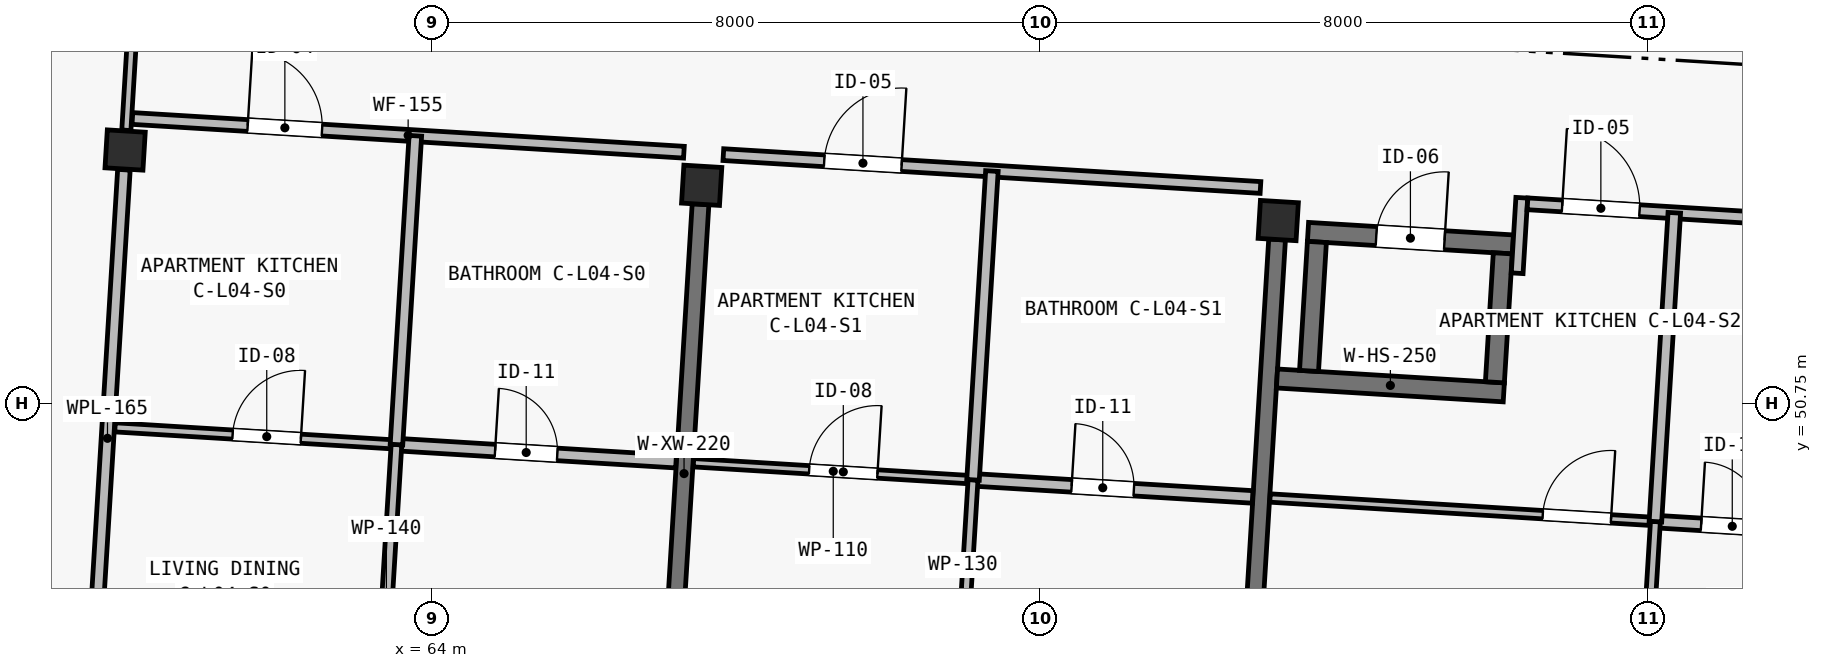
"""IFC4 building model, lengths in metres.
Left out: names, types, materials, properties, quantities, classifications, styles, units other than length and angle.
Written with IfcOpenShell. Run it as: python <this file> out.ifc"""

import sys

from ifc_helpers import new_model, si_unit, direction, frame, frame_2d, origin, origin_2d, place, context, subcontext, project, spatial, rectangle, extrude, element, fill, save


model = new_model("IFC4")
c1 = context("Model", 3, precision=1e-05, world=origin(), true_north=direction((0.0, 1.0)))
c2 = subcontext(c1, "Body", "Model", "MODEL_VIEW")
j1 = project(units=[si_unit("LENGTHUNIT", "METRE"), si_unit("PLANEANGLEUNIT", "RADIAN")], contexts=[c1])
p1 = place(None, origin())
s1 = spatial("IfcSite", under=j1, at=p1, CompositionType="ELEMENT")
p2 = place(p1, origin())
s2 = spatial("IfcBuilding", under=s1, at=p2, CompositionType="ELEMENT")
p3 = place(p2, frame((0.0, 0.0, 14.9)))
s3 = spatial("IfcBuildingStorey", under=s2, at=p3, CompositionType="ELEMENT", Elevation=14.9)
for number, where, z_axis, x_axis in (
    (1, (59.964, 54.086, 0.0), (0.0, 0.0, 1.0), (0.998, -0.061, 0.0)),
    (2, (67.55, 53.622, 0.0), (0.0, 0.0, 1.0), (0.998, -0.061, 0.0)),
    (3, (75.135, 53.158, 0.0), (0.0, 0.0, 1.0), (0.998, -0.061, 0.0)),
):
    element("IfcColumn", number, at=place(p3, frame(where, z_axis=z_axis, x_axis=x_axis)), inside=s3, PredefinedType="COLUMN", context=c2, shape_type="SweptSolid", body=[
        extrude(rectangle(XDim=0.5, YDim=0.5, at=origin_2d()), origin(), (0.0, 0.0, 1.0), 3.25),
    ])
p4 = place(p3, frame((67.101, 46.286, 0.0), z_axis=(0.0, 0.0, 1.0), x_axis=(0.061035953884, 0.998135568114, 0.0)))
e4 = element("IfcWall", 4, at=p4, inside=s3, PredefinedType="SHEAR", context=c2, shape_type="SweptSolid", body=[
    extrude(rectangle(XDim=7.1, YDim=0.22, at=frame_2d((3.55, 0.0))), origin(), (0.0, 0.0, 1.0), 2.5),
])
p5 = place(p3, frame((74.687, 45.822, 0.0), z_axis=(0.0, 0.0, 1.0), x_axis=(0.061033859059, 0.99813569621, 0.0)))
e5 = element("IfcWall", 5, at=p5, inside=s3, PredefinedType="SHEAR", context=c2, shape_type="SweptSolid", body=[
    extrude(rectangle(XDim=7.1, YDim=0.22, at=frame_2d((3.55, 0.0))), origin(), (0.0, 0.0, 1.0), 2.5),
])
p6 = place(p3, frame((75.119, 51.08, 0.0), z_axis=(0.0, 0.0, 1.0), x_axis=(0.998133370443, -0.061071882298, 0.0)))
e6 = element("IfcWall", 6, at=p6, inside=s3, PredefinedType="SHEAR", context=c2, shape_type="SweptSolid", body=[
    extrude(rectangle(XDim=2.99, YDim=0.25, at=frame_2d((1.495, 0.0))), origin(), (0.0, 0.0, 1.0), 3.25),
])
p7 = place(p3, frame((75.527, 53.009, 0.0), z_axis=(0.0, 0.0, 1.0), x_axis=(0.998129907752, -0.061128448781, 0.0)))
e7 = element("IfcWall", 7, at=p7, inside=s3, PredefinedType="SHEAR", context=c2, shape_type="SweptSolid", body=[
    extrude(rectangle(XDim=2.7, YDim=0.25, at=frame_2d((1.35, 0.0))), origin(), (0.0, 0.0, 1.0), 3.25),
])
p8 = place(p7, frame((0.9, 0.0, 0.0)))
e8 = element("IfcOpeningElement", 8, at=p8, cuts=e7, PredefinedType="OPENING", context=c2, shape_type="SweptSolid", body=[
    extrude(rectangle(XDim=0.9, YDim=2.05, at=frame_2d((0.45, 1.025))), frame((0.0, 0.14, 0.0), z_axis=(0.0, -1.0, 0.0), x_axis=(1.0, 0.0, 0.0)), (0.0, 0.0, 1.0), 0.28),
])
p9 = place(p3, frame((75.541, 51.179, 0.0), z_axis=(0.0, 0.0, 1.0), x_axis=(0.061037062968, 0.998135500293, 0.0)))
e9 = element("IfcWall", 9, at=p9, inside=s3, PredefinedType="SHEAR", context=c2, shape_type="SweptSolid", body=[
    extrude(rectangle(XDim=1.7, YDim=0.25, at=frame_2d((0.85, 0.0))), origin(), (0.0, 0.0, 1.0), 3.25),
])
p10 = place(p3, frame((77.986, 51.03, 0.0), z_axis=(0.0, 0.0, 1.0), x_axis=(0.061028314627, 0.998136035225, 0.0)))
e10 = element("IfcWall", 10, at=p10, inside=s3, PredefinedType="SHEAR", context=c2, shape_type="SweptSolid", body=[
    extrude(rectangle(XDim=1.7, YDim=0.25, at=frame_2d((0.85, 0.0))), origin(), (0.0, 0.0, 1.0), 3.25),
])
p11 = place(p3, frame((58.944, 46.008, 0.0), z_axis=(0.0, 0.0, 1.0), x_axis=(-0.897775054318, 0.440454256246, 0.0)))
e11 = element("IfcWall", 11, at=p11, inside=s3, PredefinedType="SOLIDWALL", context=c2, shape_type="SweptSolid", body=[
    extrude(rectangle(XDim=8.12, YDim=0.26, at=frame_2d((4.06, 0.0))), origin(), (0.0, 0.0, 1.0), 3.0),
])
p12 = place(p11, frame((2.45, 0.0, 0.45)))
e12 = element("IfcOpeningElement", 12, at=p12, cuts=e11, PredefinedType="OPENING", context=c2, shape_type="SweptSolid", body=[
    extrude(rectangle(XDim=0.76, YDim=2.34, at=frame_2d((0.38, 1.17))), frame((0.0, 0.145, 0.0), z_axis=(0.0, -1.0, 0.0), x_axis=(1.0, 0.0, 0.0)), (0.0, 0.0, 1.0), 0.29),
])
p13 = place(p11, frame((5.07, 0.0, 0.52)))
e13 = element("IfcOpeningElement", 13, at=p13, cuts=e11, PredefinedType="OPENING", context=c2, shape_type="SweptSolid", body=[
    extrude(rectangle(XDim=0.6, YDim=2.22, at=frame_2d((0.3, 1.11))), frame((0.0, 0.145, 0.0), z_axis=(0.0, -1.0, 0.0), x_axis=(1.0, 0.0, 0.0)), (0.0, 0.0, 1.0), 0.29),
])
p14 = place(p3, frame((51.654, 49.585, 0.0), z_axis=(0.0, 0.0, 1.0), x_axis=(0.448621989068, 0.893721607059, 0.0)))
e14 = element("IfcWall", 14, at=p14, inside=s3, PredefinedType="SOLIDWALL", context=c2, shape_type="SweptSolid", body=[
    extrude(rectangle(XDim=19.061, YDim=0.26, at=frame_2d((9.53, 0.0))), origin(), (0.0, 0.0, 1.0), 3.0),
])
p15 = place(p14, frame((2.45, 0.0, 0.45)))
e15 = element("IfcOpeningElement", 15, at=p15, cuts=e14, PredefinedType="OPENING", context=c2, shape_type="SweptSolid", body=[
    extrude(rectangle(XDim=0.76, YDim=2.34, at=frame_2d((0.38, 1.17))), frame((0.0, 0.145, 0.0), z_axis=(0.0, -1.0, 0.0), x_axis=(1.0, 0.0, 0.0)), (0.0, 0.0, 1.0), 0.29),
])
p16 = place(p14, frame((16.01, 0.0, 0.52)))
e16 = element("IfcOpeningElement", 16, at=p16, cuts=e14, PredefinedType="OPENING", context=c2, shape_type="SweptSolid", body=[
    extrude(rectangle(XDim=0.6, YDim=2.22, at=frame_2d((0.3, 1.11))), frame((0.0, 0.145, 0.0), z_axis=(0.0, -1.0, 0.0), x_axis=(1.0, 0.0, 0.0)), (0.0, 0.0, 1.0), 0.29),
])
p17 = place(p3, frame((59.98, 54.345, 0.0), z_axis=(0.0, 0.0, 1.0), x_axis=(0.061101107425, 0.998131581843, 0.0)))
e17 = element("IfcWall", 17, at=p17, inside=s3, PredefinedType="PARTITIONING", context=c2, shape_type="SweptSolid", body=[
    extrude(rectangle(XDim=3.88, YDim=0.12, at=frame_2d((1.94, 0.0))), origin(), (0.0, 0.0, 1.0), 2.5),
])
p18 = place(p17, frame((1.35, 0.0, 0.0)))
e18 = element("IfcOpeningElement", 18, at=p18, cuts=e17, PredefinedType="OPENING", context=c2, shape_type="SweptSolid", body=[
    extrude(rectangle(XDim=0.9, YDim=2.1, at=frame_2d((0.45, 1.05))), frame((0.0, 0.075, 0.0), z_axis=(0.0, -1.0, 0.0), x_axis=(1.0, 0.0, 0.0)), (0.0, 0.0, 1.0), 0.15),
])
p19 = place(p3, frame((59.516, 46.76, 0.0), z_axis=(0.0, 0.0, 1.0), x_axis=(0.061034344288, 0.998135666539, 0.0)))
e19 = element("IfcWall", 19, at=p19, inside=s3, PredefinedType="PLUMBINGWALL", context=c2, shape_type="SweptSolid", body=[
    extrude(rectangle(XDim=7.08, YDim=0.165, at=frame_2d((3.54, 0.0))), origin(), (0.0, 0.0, 1.0), 2.5),
])
p20 = place(p3, frame((60.06, 54.501, 0.0), z_axis=(0.0, 0.0, 1.0), x_axis=(0.998134543433, -0.06105270843, 0.0)))
e20 = element("IfcWall", 20, at=p20, inside=s3, PredefinedType="PARTITIONING", context=c2, shape_type="SweptSolid", body=[
    extrude(rectangle(XDim=7.27, YDim=0.155, at=frame_2d((3.635, 0.0))), origin(), (0.0, 0.0, 1.0), 2.97),
])
p21 = place(p20, frame((1.52, 0.0, 0.0)))
e21 = element("IfcOpeningElement", 21, at=p21, cuts=e20, PredefinedType="OPENING", context=c2, shape_type="SweptSolid", body=[
    extrude(rectangle(XDim=0.98, YDim=2.15, at=frame_2d((0.49, 1.075))), frame((0.0, 0.093, 0.0), z_axis=(0.0, -1.0, 0.0), x_axis=(1.0, 0.0, 0.0)), (0.0, 0.0, 1.0), 0.185),
])
p22 = place(p3, frame((59.831, 50.437, 0.0), z_axis=(0.0, 0.0, 1.0), x_axis=(0.998133408508, -0.061071260176, 0.0)))
e22 = element("IfcWall", 22, at=p22, inside=s3, PredefinedType="PARTITIONING", context=c2, shape_type="SweptSolid", body=[
    extrude(rectangle(XDim=3.71, YDim=0.12, at=frame_2d((1.855, 0.0))), origin(), (0.0, 0.0, 1.0), 2.97),
])
p23 = place(p22, frame((1.55, 0.0, 0.0)))
e23 = element("IfcOpeningElement", 23, at=p23, cuts=e22, PredefinedType="OPENING", context=c2, shape_type="SweptSolid", body=[
    extrude(rectangle(XDim=0.9, YDim=2.1, at=frame_2d((0.45, 1.05))), frame((0.0, 0.075, 0.0), z_axis=(0.0, -1.0, 0.0), x_axis=(1.0, 0.0, 0.0)), (0.0, 0.0, 1.0), 0.15),
])
p24 = place(p3, frame((63.534, 50.211, 0.0), z_axis=(0.0, 0.0, 1.0), x_axis=(0.998132682596, -0.061083123148, 0.0)))
e24 = element("IfcWall", 24, at=p24, inside=s3, PredefinedType="PLUMBINGWALL", context=c2, shape_type="SweptSolid", body=[
    extrude(rectangle(XDim=3.685, YDim=0.165, at=frame_2d((1.843, 0.0))), origin(), (0.0, 0.0, 1.0), 2.97),
])
p25 = place(p24, frame((1.3, 0.0, 0.0)))
e25 = element("IfcOpeningElement", 25, at=p25, cuts=e24, PredefinedType="OPENING", context=c2, shape_type="SweptSolid", body=[
    extrude(rectangle(XDim=0.82, YDim=2.08, at=frame_2d((0.41, 1.04))), frame((0.0, 0.097, 0.0), z_axis=(0.0, -1.0, 0.0), x_axis=(1.0, 0.0, 0.0)), (0.0, 0.0, 1.0), 0.195),
])
p26 = place(p3, frame((63.269, 45.879, 0.0), z_axis=(0.0, 0.0, 1.0), x_axis=(0.06103343432, 0.998135722182, 0.0)))
e26 = element("IfcWall", 26, at=p26, inside=s3, PredefinedType="PARTITIONING", context=c2, shape_type="SweptSolid", body=[
    extrude(rectangle(XDim=4.34, YDim=0.14, at=frame_2d((2.17, 0.0))), origin(), (0.0, 0.0, 1.0), 2.97),
])
p27 = place(p26, frame((1.35, 0.0, 0.0)))
e27 = element("IfcOpeningElement", 27, at=p27, cuts=e26, PredefinedType="OPENING", context=c2, shape_type="SweptSolid", body=[
    extrude(rectangle(XDim=0.9, YDim=2.1, at=frame_2d((0.45, 1.05))), frame((0.0, 0.085, 0.0), z_axis=(0.0, -1.0, 0.0), x_axis=(1.0, 0.0, 0.0)), (0.0, 0.0, 1.0), 0.17),
])
p28 = place(p3, frame((63.534, 50.211, 0.0), z_axis=(0.0, 0.0, 1.0), x_axis=(0.061067374954, 0.99813364622, 0.0)))
e28 = element("IfcWall", 28, at=p28, inside=s3, PredefinedType="PLUMBINGWALL", context=c2, shape_type="SweptSolid", body=[
    extrude(rectangle(XDim=4.07, YDim=0.165, at=frame_2d((2.035, 0.0))), origin(), (0.0, 0.0, 1.0), 2.97),
])
p29 = place(p3, frame((67.835, 54.025, 0.0), z_axis=(0.0, 0.0, 1.0), x_axis=(0.998135666539, -0.061034344288, 0.0)))
e29 = element("IfcWall", 29, at=p29, inside=s3, PredefinedType="PARTITIONING", context=c2, shape_type="SweptSolid", body=[
    extrude(rectangle(XDim=7.08, YDim=0.155, at=frame_2d((3.54, 0.0))), origin(), (0.0, 0.0, 1.0), 2.97),
])
p30 = place(p29, frame((1.33, 0.0, 0.0)))
e30 = element("IfcOpeningElement", 30, at=p30, cuts=e29, PredefinedType="OPENING", context=c2, shape_type="SweptSolid", body=[
    extrude(rectangle(XDim=1.02, YDim=2.2, at=frame_2d((0.51, 1.1))), frame((0.0, 0.093, 0.0), z_axis=(0.0, -1.0, 0.0), x_axis=(1.0, 0.0, 0.0)), (0.0, 0.0, 1.0), 0.185),
])
p31 = place(p3, frame((67.442, 49.972, 0.0), z_axis=(0.0, 0.0, 1.0), x_axis=(0.998132682596, -0.061083123148, 0.0)))
e31 = element("IfcWall", 31, at=p31, inside=s3, PredefinedType="PARTITIONING", context=c2, shape_type="SweptSolid", body=[
    extrude(rectangle(XDim=3.685, YDim=0.11, at=frame_2d((1.843, 0.0))), origin(), (0.0, 0.0, 1.0), 2.97),
])
p32 = place(p31, frame((1.525, 0.0, 0.0)))
e32 = element("IfcOpeningElement", 32, at=p32, cuts=e31, PredefinedType="OPENING", context=c2, shape_type="SweptSolid", body=[
    extrude(rectangle(XDim=0.9, YDim=2.1, at=frame_2d((0.45, 1.05))), frame((0.0, 0.07, 0.0), z_axis=(0.0, -1.0, 0.0), x_axis=(1.0, 0.0, 0.0)), (0.0, 0.0, 1.0), 0.14),
])
p33 = place(p3, frame((71.12, 49.747, 0.0), z_axis=(0.0, 0.0, 1.0), x_axis=(0.998136719672, -0.061017119263, 0.0)))
e33 = element("IfcWall", 33, at=p33, inside=s3, PredefinedType="PLUMBINGWALL", context=c2, shape_type="SweptSolid", body=[
    extrude(rectangle(XDim=3.685, YDim=0.165, at=frame_2d((1.843, 0.0))), origin(), (0.0, 0.0, 1.0), 2.97),
])
p34 = place(p33, frame((1.3, 0.0, 0.0)))
e34 = element("IfcOpeningElement", 34, at=p34, cuts=e33, PredefinedType="OPENING", context=c2, shape_type="SweptSolid", body=[
    extrude(rectangle(XDim=0.82, YDim=2.08, at=frame_2d((0.41, 1.04))), frame((0.0, 0.097, 0.0), z_axis=(0.0, -1.0, 0.0), x_axis=(1.0, 0.0, 0.0)), (0.0, 0.0, 1.0), 0.195),
])
p35 = place(p3, frame((70.855, 45.415, 0.0), z_axis=(0.0, 0.0, 1.0), x_axis=(0.061036861365, 0.998135512621, 0.0)))
e35 = element("IfcWall", 35, at=p35, inside=s3, PredefinedType="PARTITIONING", context=c2, shape_type="SweptSolid", body=[
    extrude(rectangle(XDim=4.34, YDim=0.13, at=frame_2d((2.17, 0.0))), origin(), (0.0, 0.0, 1.0), 2.97),
])
p36 = place(p35, frame((1.35, 0.0, 0.0)))
e36 = element("IfcOpeningElement", 36, at=p36, cuts=e35, PredefinedType="OPENING", context=c2, shape_type="SweptSolid", body=[
    extrude(rectangle(XDim=0.88, YDim=2.1, at=frame_2d((0.44, 1.05))), frame((0.0, 0.08, 0.0), z_axis=(0.0, -1.0, 0.0), x_axis=(1.0, 0.0, 0.0)), (0.0, 0.0, 1.0), 0.16),
])
p37 = place(p3, frame((71.12, 49.747, 0.0), z_axis=(0.0, 0.0, 1.0), x_axis=(0.061063718724, 0.998133869907, 0.0)))
e37 = element("IfcWall", 37, at=p37, inside=s3, PredefinedType="PLUMBINGWALL", context=c2, shape_type="SweptSolid", body=[
    extrude(rectangle(XDim=4.07, YDim=0.165, at=frame_2d((2.035, 0.0))), origin(), (0.0, 0.0, 1.0), 2.97),
])
p38 = place(p3, frame((78.279, 52.465, 0.0), z_axis=(0.0, 0.0, 1.0), x_axis=(0.061095097219, 0.998131949742, 0.0)))
e38 = element("IfcWall", 38, at=p38, inside=s3, PredefinedType="PARTITIONING", context=c2, shape_type="SweptSolid", body=[
    extrude(rectangle(XDim=0.995, YDim=0.155, at=frame_2d((0.498, 0.0))), origin(), (0.0, 0.0, 1.0), 2.97),
])
p39 = place(p3, frame((78.415, 53.378, 0.0), z_axis=(0.0, 0.0, 1.0), x_axis=(0.998131852862, -0.061096679962, 0.0)))
e39 = element("IfcWall", 39, at=p39, inside=s3, PredefinedType="PARTITIONING", context=c2, shape_type="SweptSolid", body=[
    extrude(rectangle(XDim=4.08, YDim=0.155, at=frame_2d((2.04, 0.0))), origin(), (0.0, 0.0, 1.0), 2.97),
])
p40 = place(p39, frame((0.457, 0.0, 0.0)))
e40 = element("IfcOpeningElement", 40, at=p40, cuts=e39, PredefinedType="OPENING", context=c2, shape_type="SweptSolid", body=[
    extrude(rectangle(XDim=1.02, YDim=2.2, at=frame_2d((0.51, 1.1))), frame((0.0, 0.093, 0.0), z_axis=(0.0, -1.0, 0.0), x_axis=(1.0, 0.0, 0.0)), (0.0, 0.0, 1.0), 0.185),
])
p41 = place(p3, frame((75.028, 49.508, 0.0), z_axis=(0.0, 0.0, 1.0), x_axis=(0.998135637207, -0.061034823981, 0.0)))
e41 = element("IfcWall", 41, at=p41, inside=s3, PredefinedType="PARTITIONING", context=c2, shape_type="SweptSolid", body=[
    extrude(rectangle(XDim=5.08, YDim=0.11, at=frame_2d((2.54, 0.0))), origin(), (0.0, 0.0, 1.0), 2.97),
])
p42 = place(p41, frame((3.595, 0.0, 0.0)))
e42 = element("IfcOpeningElement", 42, at=p42, cuts=e41, PredefinedType="OPENING", context=c2, shape_type="SweptSolid", body=[
    extrude(rectangle(XDim=0.9, YDim=2.1, at=frame_2d((0.45, 1.05))), frame((0.0, 0.07, 0.0), z_axis=(0.0, -1.0, 0.0), x_axis=(1.0, 0.0, 0.0)), (0.0, 0.0, 1.0), 0.14),
])
p43 = place(p3, frame((80.098, 49.198, 0.0), z_axis=(0.0, 0.0, 1.0), x_axis=(0.998138723231, -0.060984335579, 0.0)))
e43 = element("IfcWall", 43, at=p43, inside=s3, PredefinedType="PLUMBINGWALL", context=c2, shape_type="SweptSolid", body=[
    extrude(rectangle(XDim=2.29, YDim=0.165, at=frame_2d((1.145, 0.0))), origin(), (0.0, 0.0, 1.0), 2.97),
])
p44 = place(p43, frame((0.603, 0.0, 0.0)))
e44 = element("IfcOpeningElement", 44, at=p44, cuts=e43, PredefinedType="OPENING", context=c2, shape_type="SweptSolid", body=[
    extrude(rectangle(XDim=0.82, YDim=2.08, at=frame_2d((0.41, 1.04))), frame((0.0, 0.097, 0.0), z_axis=(0.0, -1.0, 0.0), x_axis=(1.0, 0.0, 0.0)), (0.0, 0.0, 1.0), 0.195),
])
p45 = place(p3, frame((79.833, 44.866, 0.0), z_axis=(0.0, 0.0, 1.0), x_axis=(0.061036861365, 0.998135512621, 0.0)))
e45 = element("IfcWall", 45, at=p45, inside=s3, PredefinedType="PARTITIONING", context=c2, shape_type="SweptSolid", body=[
    extrude(rectangle(XDim=4.34, YDim=0.13, at=frame_2d((2.17, 0.0))), origin(), (0.0, 0.0, 1.0), 2.97),
])
p46 = place(p45, frame((1.35, 0.0, 0.0)))
e46 = element("IfcOpeningElement", 46, at=p46, cuts=e45, PredefinedType="OPENING", context=c2, shape_type="SweptSolid", body=[
    extrude(rectangle(XDim=0.88, YDim=2.1, at=frame_2d((0.44, 1.05))), frame((0.0, 0.08, 0.0), z_axis=(0.0, -1.0, 0.0), x_axis=(1.0, 0.0, 0.0)), (0.0, 0.0, 1.0), 0.16),
])
p47 = place(p3, frame((80.098, 49.198, 0.0), z_axis=(0.0, 0.0, 1.0), x_axis=(0.061063718724, 0.998133869907, 0.0)))
e47 = element("IfcWall", 47, at=p47, inside=s3, PredefinedType="PLUMBINGWALL", context=c2, shape_type="SweptSolid", body=[
    extrude(rectangle(XDim=4.07, YDim=0.165, at=frame_2d((2.035, 0.0))), origin(), (0.0, 0.0, 1.0), 2.97),
])
p48 = place(p21, origin())
e48 = element("IfcDoor", 48, at=p48, inside=s3, OperationType="SINGLE_SWING_LEFT", PredefinedType="DOOR", context=c2, shape_type="SweptSolid", body=[
    extrude(rectangle(XDim=0.98, YDim=2.15, at=frame_2d((0.49, 1.075))), frame((0.0, 0.025, 0.0), z_axis=(0.0, -1.0, 0.0), x_axis=(1.0, 0.0, 0.0)), (0.0, 0.0, 1.0), 0.05),
])
fill(e21, e48)
p49 = place(p23, origin())
e49 = element("IfcDoor", 49, at=p49, inside=s3, OperationType="SINGLE_SWING_RIGHT", PredefinedType="DOOR", context=c2, shape_type="SweptSolid", body=[
    extrude(rectangle(XDim=0.9, YDim=2.1, at=frame_2d((0.45, 1.05))), frame((0.0, 0.025, 0.0), z_axis=(0.0, -1.0, 0.0), x_axis=(1.0, 0.0, 0.0)), (0.0, 0.0, 1.0), 0.05),
])
fill(e23, e49)
p50 = place(p25, origin())
e50 = element("IfcDoor", 50, at=p50, inside=s3, OperationType="SINGLE_SWING_LEFT", PredefinedType="DOOR", context=c2, shape_type="SweptSolid", body=[
    extrude(rectangle(XDim=0.82, YDim=2.08, at=frame_2d((0.41, 1.04))), frame((0.0, 0.025, 0.0), z_axis=(0.0, -1.0, 0.0), x_axis=(1.0, 0.0, 0.0)), (0.0, 0.0, 1.0), 0.05),
])
fill(e25, e50)
p51 = place(p30, origin())
e51 = element("IfcDoor", 51, at=p51, inside=s3, OperationType="SINGLE_SWING_RIGHT", PredefinedType="DOOR", context=c2, shape_type="SweptSolid", body=[
    extrude(rectangle(XDim=1.02, YDim=2.2, at=frame_2d((0.51, 1.1))), frame((0.0, 0.025, 0.0), z_axis=(0.0, -1.0, 0.0), x_axis=(1.0, 0.0, 0.0)), (0.0, 0.0, 1.0), 0.05),
])
fill(e30, e51)
p52 = place(p32, origin())
e52 = element("IfcDoor", 52, at=p52, inside=s3, OperationType="SINGLE_SWING_RIGHT", PredefinedType="DOOR", context=c2, shape_type="SweptSolid", body=[
    extrude(rectangle(XDim=0.9, YDim=2.1, at=frame_2d((0.45, 1.05))), frame((0.0, 0.025, 0.0), z_axis=(0.0, -1.0, 0.0), x_axis=(1.0, 0.0, 0.0)), (0.0, 0.0, 1.0), 0.05),
])
fill(e32, e52)
p53 = place(p34, origin())
e53 = element("IfcDoor", 53, at=p53, inside=s3, OperationType="SINGLE_SWING_LEFT", PredefinedType="DOOR", context=c2, shape_type="SweptSolid", body=[
    extrude(rectangle(XDim=0.82, YDim=2.08, at=frame_2d((0.41, 1.04))), frame((0.0, 0.025, 0.0), z_axis=(0.0, -1.0, 0.0), x_axis=(1.0, 0.0, 0.0)), (0.0, 0.0, 1.0), 0.05),
])
fill(e34, e53)
p54 = place(p40, origin())
e54 = element("IfcDoor", 54, at=p54, inside=s3, OperationType="SINGLE_SWING_LEFT", PredefinedType="DOOR", context=c2, shape_type="SweptSolid", body=[
    extrude(rectangle(XDim=1.02, YDim=2.2, at=frame_2d((0.51, 1.1))), frame((0.0, 0.025, 0.0), z_axis=(0.0, -1.0, 0.0), x_axis=(1.0, 0.0, 0.0)), (0.0, 0.0, 1.0), 0.05),
])
fill(e40, e54)
p55 = place(p42, origin())
e55 = element("IfcDoor", 55, at=p55, inside=s3, OperationType="SINGLE_SWING_RIGHT", PredefinedType="DOOR", context=c2, shape_type="SweptSolid", body=[
    extrude(rectangle(XDim=0.9, YDim=2.1, at=frame_2d((0.45, 1.05))), frame((0.0, 0.025, 0.0), z_axis=(0.0, -1.0, 0.0), x_axis=(1.0, 0.0, 0.0)), (0.0, 0.0, 1.0), 0.05),
])
fill(e42, e55)
p56 = place(p44, origin())
e56 = element("IfcDoor", 56, at=p56, inside=s3, OperationType="SINGLE_SWING_LEFT", PredefinedType="DOOR", context=c2, shape_type="SweptSolid", body=[
    extrude(rectangle(XDim=0.82, YDim=2.08, at=frame_2d((0.41, 1.04))), frame((0.0, 0.025, 0.0), z_axis=(0.0, -1.0, 0.0), x_axis=(1.0, 0.0, 0.0)), (0.0, 0.0, 1.0), 0.05),
])
fill(e44, e56)
p57 = place(p8, origin())
e57 = element("IfcDoor", 57, at=p57, inside=s3, OperationType="SINGLE_SWING_RIGHT", PredefinedType="DOOR", context=c2, shape_type="SweptSolid", body=[
    extrude(rectangle(XDim=0.9, YDim=2.05, at=frame_2d((0.45, 1.025))), frame((0.0, 0.025, 0.0), z_axis=(0.0, -1.0, 0.0), x_axis=(1.0, 0.0, 0.0)), (0.0, 0.0, 1.0), 0.05),
])
fill(e8, e57)
save(model, sys.argv[1])
